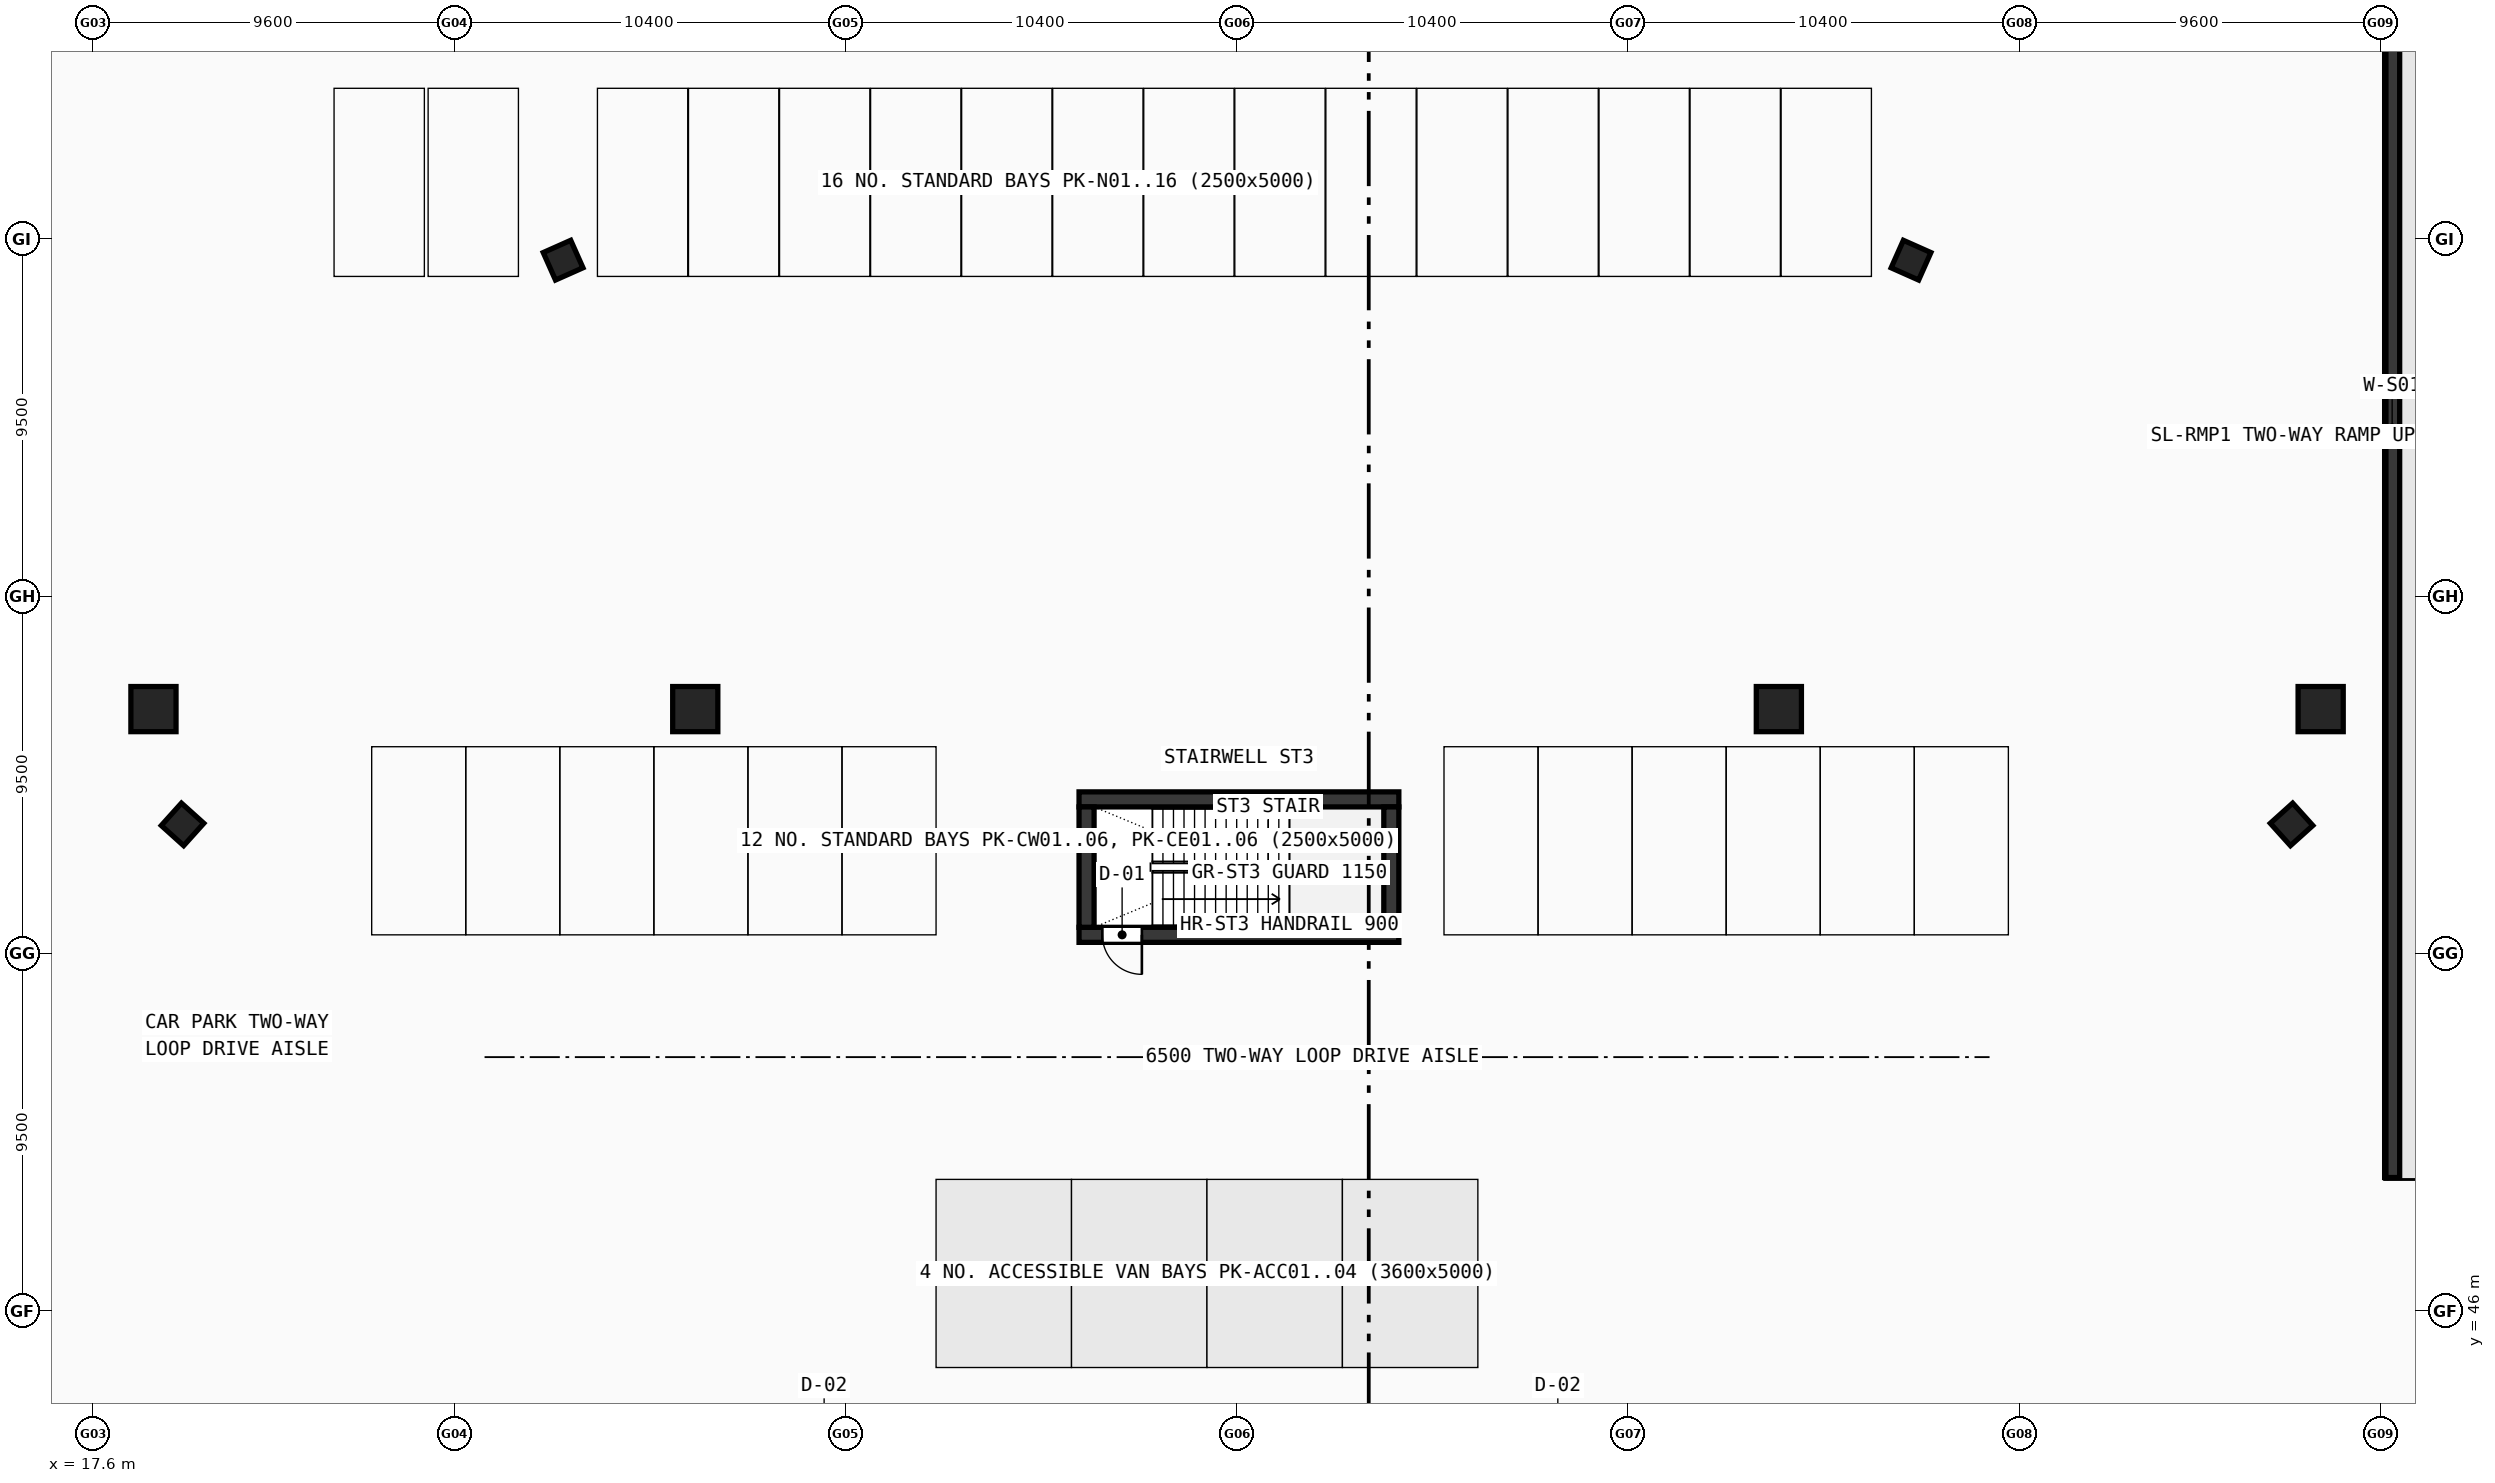
"""IFC4 building model, lengths in metres.
Left out: names, types, materials, properties, quantities, classifications, styles, units other than length and angle.
Written with IfcOpenShell. Run it as: python <this file> out.ifc"""

import sys

from ifc_helpers import new_model, si_unit, direction, frame, frame_2d, origin, origin_2d, place, context, subcontext, project, spatial, polyline, rectangle, hollow_rectangle, outline, extrude, source, transform, mapped, element, fill, save


model = new_model("IFC4")
c1 = context("Model", 3, precision=1e-05, world=origin(), true_north=direction((0.0, 1.0)))
c2 = subcontext(c1, "Body", "Model", "MODEL_VIEW")
j1 = project(units=[si_unit("LENGTHUNIT", "METRE"), si_unit("PLANEANGLEUNIT", "RADIAN")], contexts=[c1])
p1 = place(None, origin())
s1 = spatial("IfcSite", under=j1, at=p1, CompositionType="ELEMENT")
p2 = place(p1, origin())
s2 = spatial("IfcBuilding", under=s1, at=p2, CompositionType="ELEMENT")
p3 = place(p2, frame((0.0, 0.0, -4.8)))
s3 = spatial("IfcBuildingStorey", under=s2, at=p3, CompositionType="ELEMENT", Elevation=-4.8)
p4 = place(p3, frame((78.7, 49.55, -0.3), z_axis=(0.0, 0.0, 1.0), x_axis=(0.0, 1.0, 0.0)))
e1 = element("IfcWall", 1, at=p4, inside=s3, PredefinedType="SHEAR", context=c2, shape_type="SweptSolid", body=[
    extrude(outline(polyline([(0.0, 0.0), (39.85, 0.0), (39.85, 4.82), (39.45, 4.8), (0.0, 0.01), (0.0, 0.0)])), frame((0.0, 0.2, 0.0), z_axis=(0.0, -1.0, 0.0), x_axis=(1.0, 0.0, 0.0)), (0.0, 0.0, 1.0), 0.4),
])
p5 = place(p3, frame((43.8, 59.6, 0.0), z_axis=(0.0, 0.0, 1.0), x_axis=(1.0, 0.0, 0.0)))
e2 = element("IfcWall", 2, at=p5, inside=s3, PredefinedType="SHEAR", context=c2, shape_type="SweptSolid", body=[
    extrude(rectangle(XDim=8.5, YDim=0.4, at=frame_2d((4.25, 0.0))), origin(), (0.0, 0.0, 1.0), 4.52),
])
p6 = place(p3, frame((43.8, 56.0, 0.0), z_axis=(0.0, 0.0, 1.0), x_axis=(1.0, 0.0, 0.0)))
e3 = element("IfcWall", 3, at=p6, inside=s3, PredefinedType="SHEAR", context=c2, shape_type="SweptSolid", body=[
    extrude(rectangle(XDim=8.5, YDim=0.4, at=frame_2d((4.25, 0.0))), origin(), (0.0, 0.0, 1.0), 4.52),
])
p7 = place(p6, frame((0.62, 0.0, 0.0)))
e4 = element("IfcOpeningElement", 4, at=p7, cuts=e3, PredefinedType="OPENING", context=c2, shape_type="SweptSolid", body=[
    extrude(rectangle(XDim=1.05, YDim=2.1, at=frame_2d((0.525, 1.05))), frame((0.0, 0.21, 0.0), z_axis=(0.0, -1.0, 0.0), x_axis=(1.0, 0.0, 0.0)), (0.0, 0.0, 1.0), 0.42),
])
for number, where, z_axis, x_axis in (
    (5, (44.0, 56.2, 0.0), (0.0, 0.0, 1.0), (0.0, 1.0, 0.0)),
    (6, (52.1, 56.2, 0.0), (0.0, 0.0, 1.0), (0.0, 1.0, 0.0)),
):
    element("IfcWall", number, at=place(p3, frame(where, z_axis=z_axis, x_axis=x_axis)), inside=s3, PredefinedType="SHEAR", context=c2, shape_type="SweptSolid", body=[
        extrude(rectangle(XDim=3.2, YDim=0.4, at=frame_2d((1.6, 0.0))), origin(), (0.0, 0.0, 1.0), 4.52),
    ])
m1 = source(origin(), c2, "Body", "SweptSolid", [
    extrude(hollow_rectangle(XDim=1.2, YDim=1.2, WallThickness=0.05, at=origin_2d()), origin(), (0.0, 0.0, 1.0), 4.82),
])
for number, where, z_axis, x_axis in (
    (7, (19.2, 62.0, -0.3), (0.0, 0.0, 1.0), (1.0, 0.0, 0.0)),
    (8, (33.6, 62.0, -0.3), (0.0, 0.0, 1.0), (1.0, 0.0, 0.0)),
    (9, (62.4, 62.0, -0.3), (0.0, 0.0, 1.0), (1.0, 0.0, 0.0)),
    (10, (76.8, 62.0, -0.3), (0.0, 0.0, 1.0), (1.0, 0.0, 0.0)),
):
    element("IfcColumn", number, at=place(p3, frame(where, z_axis=z_axis, x_axis=x_axis)), inside=s3, PredefinedType="COLUMN", context=c2, shape_type="MappedRepresentation", body=[
        mapped(m1, transform((0.0, 0.0, 0.0), scale=1.0)),
    ])
m2 = source(origin(), c2, "Body", "SweptSolid", [
    extrude(hollow_rectangle(XDim=0.8, YDim=0.8, WallThickness=0.032, at=origin_2d()), origin(), (0.0, 0.0, 1.0), 4.82),
])
for number, where, z_axis, x_axis in (
    (11, (76.027, 58.935, -0.3), (0.0, 0.0, 1.0), (-0.669, 0.743, 0.0)),
    (12, (65.913, 73.932, -0.3), (0.0, 0.0, 1.0), (-0.914, 0.407, 0.0)),
    (13, (30.088, 73.932, -0.3), (0.0, 0.0, 1.0), (-0.914, -0.407, 0.0)),
    (14, (19.973, 58.935, -0.3), (0.0, 0.0, 1.0), (-0.669, -0.743, 0.0)),
):
    element("IfcColumn", number, at=place(p3, frame(where, z_axis=z_axis, x_axis=x_axis)), inside=s3, PredefinedType="COLUMN", context=c2, shape_type="MappedRepresentation", body=[
        mapped(m2, transform((0.0, 0.0, 0.0), scale=1.0)),
    ])
m3 = source(origin(), c2, "Body", "SweptSolid", [
    extrude(rectangle(XDim=1.05, YDim=2.1, at=frame_2d((0.525, 1.05))), frame((0.0, 0.025, 0.0), z_axis=(0.0, -1.0, 0.0), x_axis=(1.0, 0.0, 0.0)), (0.0, 0.0, 1.0), 0.05),
])
p8 = place(p7, frame((1.05, 0.0, 0.0), z_axis=(0.0, 0.0, 1.0), x_axis=(-1.0, 0.0, 0.0)))
e15 = element("IfcDoor", 15, at=p8, inside=s3, OperationType="SINGLE_SWING_LEFT", PredefinedType="DOOR", context=c2, shape_type="MappedRepresentation", body=[
    mapped(m3, transform((0.0, 0.0, 0.0), scale=1.0)),
])
fill(e4, e15)
save(model, sys.argv[1])
